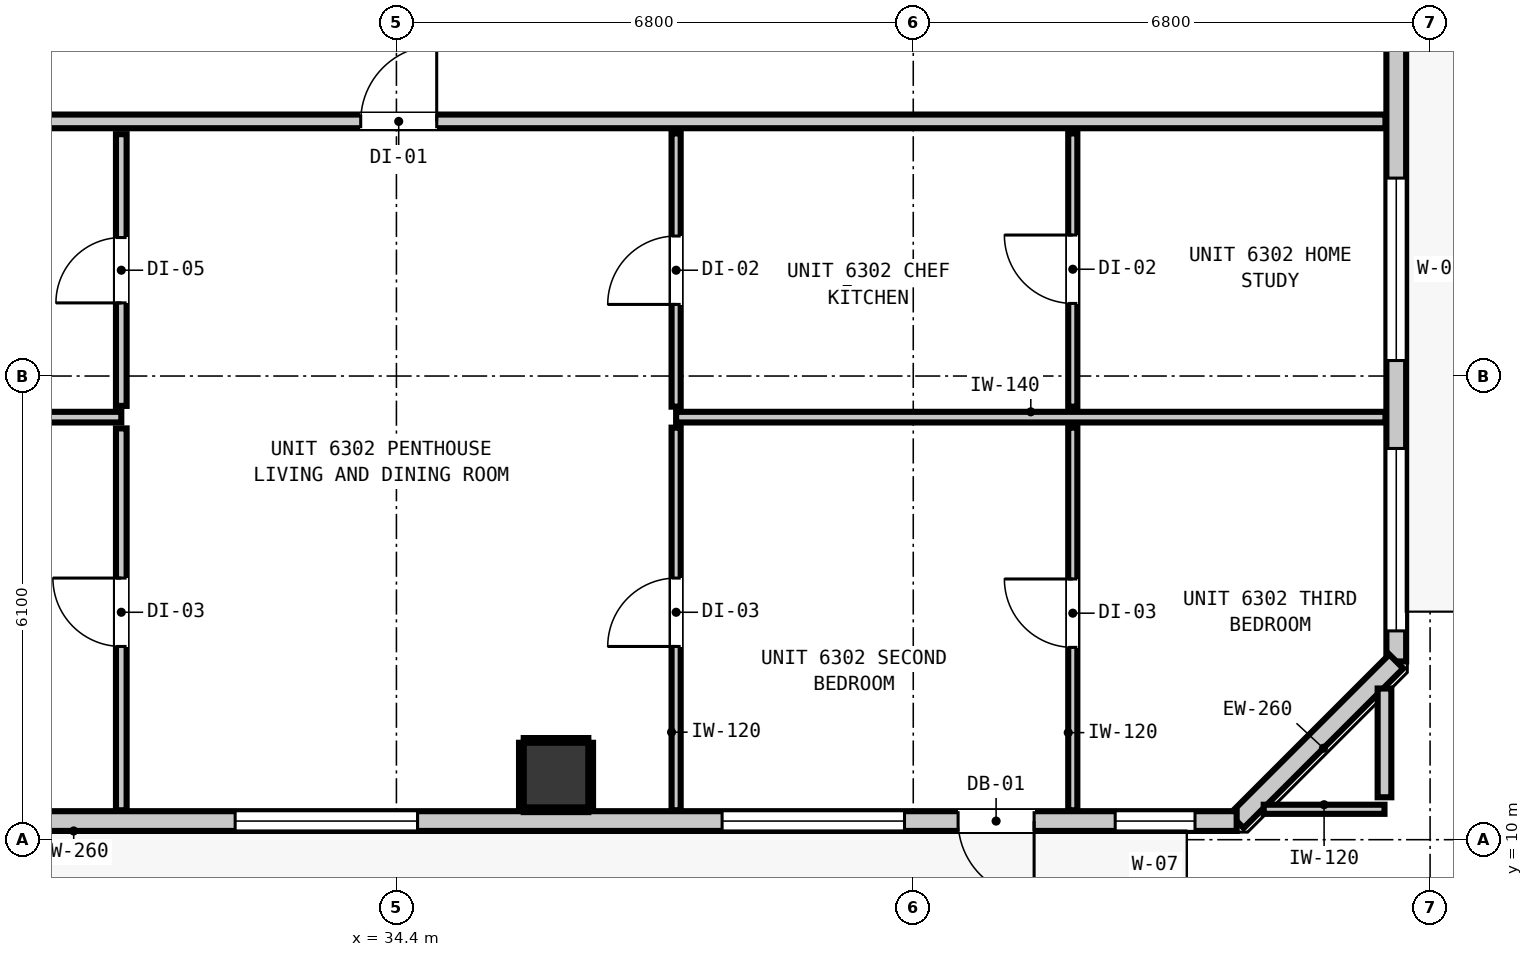
"""IFC4 building model, lengths in metres.
Left out: names, types, materials, properties, quantities, classifications, styles, units other than length and angle.
Written with IfcOpenShell. Run it as: python <this file> out.ifc"""

import sys

from ifc_helpers import new_model, si_unit, direction, frame, frame_2d, origin, origin_2d, place, context, subcontext, project, spatial, rectangle, extrude, element, fill, save


model = new_model("IFC4")
c1 = context("Model", 3, precision=1e-05, world=origin(), true_north=direction((0.0, 1.0)))
c2 = subcontext(c1, "Body", "Model", "MODEL_VIEW")
j1 = project(units=[si_unit("LENGTHUNIT", "METRE"), si_unit("PLANEANGLEUNIT", "RADIAN")], contexts=[c1])
p1 = place(None, origin())
s1 = spatial("IfcSite", under=j1, at=p1, CompositionType="ELEMENT")
p2 = place(p1, origin())
s2 = spatial("IfcBuilding", under=s1, at=p2, CompositionType="ELEMENT")
p3 = place(p2, frame((0.0, 0.0, 216.72)))
s3 = spatial("IfcBuildingStorey", under=s2, at=p3, CompositionType="ELEMENT", Elevation=216.72)
p4 = place(p3, frame((36.5, 10.85, 0.0), z_axis=(0.0, 0.0, 1.0), x_axis=(1.0, 0.0, 0.0)))
e1 = element("IfcColumn", 1, at=p4, inside=s3, PredefinedType="COLUMN", context=c2, shape_type="SweptSolid", body=[
    extrude(rectangle(XDim=0.85, YDim=0.85, at=origin_2d()), origin(), (0.0, 0.0, 1.0), 3.32),
])
p5 = place(p3, frame((47.555, 42.655, 0.0), z_axis=(0.0, 0.0, 1.0), x_axis=(0.0, -1.0, 0.0)))
e2 = element("IfcWall", 2, at=p5, inside=s3, PredefinedType="STANDARD", context=c2, shape_type="SweptSolid", body=[
    extrude(rectangle(XDim=30.31, YDim=0.26, at=frame_2d((15.155, 0.0))), origin(), (0.0, 0.0, 1.0), 3.1),
])
p6 = place(p5, frame((4.082, 0.0, 0.0)))
e3 = element("IfcOpeningElement", 3, at=p6, cuts=e2, PredefinedType="OPENING", context=c2, shape_type="SweptSolid", body=[
    extrude(rectangle(XDim=1.0, YDim=2.15, at=frame_2d((0.5, 1.075))), frame((0.0, 0.14, 0.0), z_axis=(0.0, -1.0, 0.0), x_axis=(1.0, 0.0, 0.0)), (0.0, 0.0, 1.0), 0.28),
])
p7 = place(p5, frame((23.951, 0.0, 0.85)))
e4 = element("IfcOpeningElement", 4, at=p7, cuts=e2, PredefinedType="OPENING", context=c2, shape_type="SweptSolid", body=[
    extrude(rectangle(XDim=2.4, YDim=1.95, at=frame_2d((1.2, 0.975))), frame((0.0, 0.14, 0.0), z_axis=(0.0, -1.0, 0.0), x_axis=(1.0, 0.0, 0.0)), (0.0, 0.0, 1.0), 0.28),
])
p8 = place(p5, frame((27.508, 0.0, 0.85)))
e5 = element("IfcOpeningElement", 5, at=p8, cuts=e2, PredefinedType="OPENING", context=c2, shape_type="SweptSolid", body=[
    extrude(rectangle(XDim=2.4, YDim=1.95, at=frame_2d((1.2, 0.975))), frame((0.0, 0.14, 0.0), z_axis=(0.0, -1.0, 0.0), x_axis=(1.0, 0.0, 0.0)), (0.0, 0.0, 1.0), 0.28),
])
p9 = place(p5, frame((15.105, 0.0, 0.85)))
e6 = element("IfcOpeningElement", 6, at=p9, cuts=e2, PredefinedType="OPENING", context=c2, shape_type="SweptSolid", body=[
    extrude(rectangle(XDim=2.4, YDim=1.95, at=frame_2d((1.2, 0.975))), frame((0.0, 0.14, 0.0), z_axis=(0.0, -1.0, 0.0), x_axis=(1.0, 0.0, 0.0)), (0.0, 0.0, 1.0), 0.28),
])
p10 = place(p3, frame((47.555, 12.345, 0.0), z_axis=(0.0, 0.0, 1.0), x_axis=(-0.707106781187, -0.707106781187, 0.0)))
e7 = element("IfcWall", 7, at=p10, inside=s3, PredefinedType="STANDARD", context=c2, shape_type="SweptSolid", body=[
    extrude(rectangle(XDim=2.97, YDim=0.26, at=frame_2d((1.485, 0.0))), origin(), (0.0, 0.0, 1.0), 3.1),
])
p11 = place(p3, frame((45.455, 10.245, 0.0), z_axis=(0.0, 0.0, 1.0), x_axis=(-1.0, 0.0, 0.0)))
e8 = element("IfcWall", 8, at=p11, inside=s3, PredefinedType="STANDARD", context=c2, shape_type="SweptSolid", body=[
    extrude(rectangle(XDim=32.71, YDim=0.26, at=frame_2d((16.355, 0.0))), origin(), (0.0, 0.0, 1.0), 3.1),
])
p12 = place(p11, frame((2.665, 0.0, 0.0)))
e9 = element("IfcOpeningElement", 9, at=p12, cuts=e8, PredefinedType="OPENING", context=c2, shape_type="SweptSolid", body=[
    extrude(rectangle(XDim=1.0, YDim=2.15, at=frame_2d((0.5, 1.075))), frame((0.0, 0.14, 0.0), z_axis=(0.0, -1.0, 0.0), x_axis=(1.0, 0.0, 0.0)), (0.0, 0.0, 1.0), 0.28),
])
p13 = place(p11, frame((27.147, 0.0, 0.85)))
e10 = element("IfcOpeningElement", 10, at=p13, cuts=e8, PredefinedType="OPENING", context=c2, shape_type="SweptSolid", body=[
    extrude(rectangle(XDim=2.4, YDim=1.95, at=frame_2d((1.2, 0.975))), frame((0.0, 0.14, 0.0), z_axis=(0.0, -1.0, 0.0), x_axis=(1.0, 0.0, 0.0)), (0.0, 0.0, 1.0), 0.28),
])
p14 = place(p11, frame((30.805, 0.0, 0.85)))
e11 = element("IfcOpeningElement", 11, at=p14, cuts=e8, PredefinedType="OPENING", context=c2, shape_type="SweptSolid", body=[
    extrude(rectangle(XDim=0.58, YDim=1.5, at=frame_2d((0.29, 0.75))), frame((0.0, 0.14, 0.0), z_axis=(0.0, -1.0, 0.0), x_axis=(1.0, 0.0, 0.0)), (0.0, 0.0, 1.0), 0.28),
])
p15 = place(p11, frame((21.3, 0.0, 0.85)))
e12 = element("IfcOpeningElement", 12, at=p15, cuts=e8, PredefinedType="OPENING", context=c2, shape_type="SweptSolid", body=[
    extrude(rectangle(XDim=2.4, YDim=1.95, at=frame_2d((1.2, 0.975))), frame((0.0, 0.14, 0.0), z_axis=(0.0, -1.0, 0.0), x_axis=(1.0, 0.0, 0.0)), (0.0, 0.0, 1.0), 0.28),
])
p16 = place(p11, frame((10.777, 0.0, 0.85)))
e13 = element("IfcOpeningElement", 13, at=p16, cuts=e8, PredefinedType="OPENING", context=c2, shape_type="SweptSolid", body=[
    extrude(rectangle(XDim=2.4, YDim=1.95, at=frame_2d((1.2, 0.975))), frame((0.0, 0.14, 0.0), z_axis=(0.0, -1.0, 0.0), x_axis=(1.0, 0.0, 0.0)), (0.0, 0.0, 1.0), 0.28),
])
p17 = place(p11, frame((17.425, 0.0, 0.85)))
e14 = element("IfcOpeningElement", 14, at=p17, cuts=e8, PredefinedType="OPENING", context=c2, shape_type="SweptSolid", body=[
    extrude(rectangle(XDim=2.4, YDim=1.95, at=frame_2d((1.2, 0.975))), frame((0.0, 0.14, 0.0), z_axis=(0.0, -1.0, 0.0), x_axis=(1.0, 0.0, 0.0)), (0.0, 0.0, 1.0), 0.28),
])
p18 = place(p11, frame((4.37, 0.0, 0.85)))
e15 = element("IfcOpeningElement", 15, at=p18, cuts=e8, PredefinedType="OPENING", context=c2, shape_type="SweptSolid", body=[
    extrude(rectangle(XDim=2.4, YDim=1.95, at=frame_2d((1.2, 0.975))), frame((0.0, 0.14, 0.0), z_axis=(0.0, -1.0, 0.0), x_axis=(1.0, 0.0, 0.0)), (0.0, 0.0, 1.0), 0.28),
])
p19 = place(p11, frame((0.548, 0.0, 0.85)))
e16 = element("IfcOpeningElement", 16, at=p19, cuts=e8, PredefinedType="OPENING", context=c2, shape_type="SweptSolid", body=[
    extrude(rectangle(XDim=1.05, YDim=1.65, at=frame_2d((0.525, 0.825))), frame((0.0, 0.14, 0.0), z_axis=(0.0, -1.0, 0.0), x_axis=(1.0, 0.0, 0.0)), (0.0, 0.0, 1.0), 0.28),
])
p20 = place(p3, frame((10.787, 19.45, 0.0), z_axis=(0.0, 0.0, 1.0), x_axis=(1.0, 0.0, 0.0)))
e17 = element("IfcWall", 17, at=p20, inside=s3, PredefinedType="PARTITIONING", context=c2, shape_type="SweptSolid", body=[
    extrude(rectangle(XDim=36.626, YDim=0.18, at=frame_2d((18.313, 0.0))), origin(), (0.0, 0.0, 1.0), 3.1),
])
p21 = place(p20, frame((5.82, 0.0, 0.0)))
e18 = element("IfcOpeningElement", 18, at=p21, cuts=e17, PredefinedType="OPENING", context=c2, shape_type="SweptSolid", body=[
    extrude(rectangle(XDim=1.0, YDim=2.15, at=frame_2d((0.5, 1.075))), frame((0.0, 0.1, 0.0), z_axis=(0.0, -1.0, 0.0), x_axis=(1.0, 0.0, 0.0)), (0.0, 0.0, 1.0), 0.2),
])
p22 = place(p20, frame((23.143, 0.0, 0.0)))
e19 = element("IfcOpeningElement", 19, at=p22, cuts=e17, PredefinedType="OPENING", context=c2, shape_type="SweptSolid", body=[
    extrude(rectangle(XDim=1.0, YDim=2.15, at=frame_2d((0.5, 1.075))), frame((0.0, 0.1, 0.0), z_axis=(0.0, -1.0, 0.0), x_axis=(1.0, 0.0, 0.0)), (0.0, 0.0, 1.0), 0.2),
])
p23 = place(p3, frame((19.22, 15.559, 0.0), z_axis=(0.0, 0.0, 1.0), x_axis=(1.0, 0.0, 0.0)))
e20 = element("IfcWall", 20, at=p23, inside=s3, PredefinedType="PARTITIONING", context=c2, shape_type="SweptSolid", body=[
    extrude(rectangle(XDim=11.56, YDim=0.14, at=frame_2d((5.78, 0.0))), origin(), (0.0, 0.0, 1.0), 3.1),
])
p24 = place(p3, frame((38.08, 15.559, 0.0), z_axis=(0.0, 0.0, 1.0), x_axis=(1.0, 0.0, 0.0)))
e21 = element("IfcWall", 21, at=p24, inside=s3, PredefinedType="PARTITIONING", context=c2, shape_type="SweptSolid", body=[
    extrude(rectangle(XDim=9.333, YDim=0.14, at=frame_2d((4.667, 0.0))), origin(), (0.0, 0.0, 1.0), 3.1),
])
p25 = place(p3, frame((45.811, 10.4, 0.0), z_axis=(0.0, 0.0, 1.0), x_axis=(1.0, 0.0, 0.0)))
e22 = element("IfcWall", 22, at=p25, inside=s3, PredefinedType="PARTITIONING", context=c2, shape_type="SweptSolid", body=[
    extrude(rectangle(XDim=1.589, YDim=0.12, at=frame_2d((0.794, 0.0))), origin(), (0.0, 0.0, 1.0), 3.1),
])
p26 = place(p3, frame((47.4, 10.558, 0.0), z_axis=(0.0, 0.0, 1.0), x_axis=(0.0, 1.0, 0.0)))
e23 = element("IfcWall", 23, at=p26, inside=s3, PredefinedType="PARTITIONING", context=c2, shape_type="SweptSolid", body=[
    extrude(rectangle(XDim=1.431, YDim=0.18, at=frame_2d((0.715, 0.0))), origin(), (0.0, 0.0, 1.0), 3.1),
])
p27 = place(p3, frame((30.78, 10.387, 0.0), z_axis=(0.0, 0.0, 1.0), x_axis=(0.0, 1.0, 0.0)))
e24 = element("IfcWall", 24, at=p27, inside=s3, PredefinedType="PARTITIONING", context=c2, shape_type="SweptSolid", body=[
    extrude(rectangle(XDim=5.024, YDim=0.14, at=frame_2d((2.512, 0.0))), origin(), (0.0, 0.0, 1.0), 3.1),
])
p28 = place(p27, frame((2.155, 0.0, 0.0)))
e25 = element("IfcOpeningElement", 25, at=p28, cuts=e24, PredefinedType="OPENING", context=c2, shape_type="SweptSolid", body=[
    extrude(rectangle(XDim=0.9, YDim=2.1, at=frame_2d((0.45, 1.05))), frame((0.0, 0.08, 0.0), z_axis=(0.0, -1.0, 0.0), x_axis=(1.0, 0.0, 0.0)), (0.0, 0.0, 1.0), 0.16),
])
p29 = place(p3, frame((30.78, 15.707, 0.0), z_axis=(0.0, 0.0, 1.0), x_axis=(0.0, 1.0, 0.0)))
e26 = element("IfcWall", 26, at=p29, inside=s3, PredefinedType="PARTITIONING", context=c2, shape_type="SweptSolid", body=[
    extrude(rectangle(XDim=3.575, YDim=0.14, at=frame_2d((1.788, 0.0))), origin(), (0.0, 0.0, 1.0), 3.1),
])
p30 = place(p29, frame((1.355, 0.0, 0.0)))
e27 = element("IfcOpeningElement", 27, at=p30, cuts=e26, PredefinedType="OPENING", context=c2, shape_type="SweptSolid", body=[
    extrude(rectangle(XDim=0.86, YDim=2.02, at=frame_2d((0.43, 1.01))), frame((0.0, 0.08, 0.0), z_axis=(0.0, -1.0, 0.0), x_axis=(1.0, 0.0, 0.0)), (0.0, 0.0, 1.0), 0.16),
])
p31 = place(p3, frame((38.08, 10.387, 0.0), z_axis=(0.0, 0.0, 1.0), x_axis=(0.0, 1.0, 0.0)))
e28 = element("IfcWall", 28, at=p31, inside=s3, PredefinedType="PARTITIONING", context=c2, shape_type="SweptSolid", body=[
    extrude(rectangle(XDim=5.034, YDim=0.12, at=frame_2d((2.517, 0.0))), origin(), (0.0, 0.0, 1.0), 3.1),
])
p32 = place(p31, frame((2.155, 0.0, 0.0)))
e29 = element("IfcOpeningElement", 29, at=p32, cuts=e28, PredefinedType="OPENING", context=c2, shape_type="SweptSolid", body=[
    extrude(rectangle(XDim=0.9, YDim=2.1, at=frame_2d((0.45, 1.05))), frame((0.0, 0.07, 0.0), z_axis=(0.0, -1.0, 0.0), x_axis=(1.0, 0.0, 0.0)), (0.0, 0.0, 1.0), 0.14),
])
p33 = place(p3, frame((38.08, 15.697, 0.0), z_axis=(0.0, 0.0, 1.0), x_axis=(0.0, 1.0, 0.0)))
e30 = element("IfcWall", 30, at=p33, inside=s3, PredefinedType="PARTITIONING", context=c2, shape_type="SweptSolid", body=[
    extrude(rectangle(XDim=3.595, YDim=0.12, at=frame_2d((1.797, 0.0))), origin(), (0.0, 0.0, 1.0), 3.1),
])
p34 = place(p33, frame((1.345, 0.0, 0.0)))
e31 = element("IfcOpeningElement", 31, at=p34, cuts=e30, PredefinedType="OPENING", context=c2, shape_type="SweptSolid", body=[
    extrude(rectangle(XDim=0.9, YDim=2.1, at=frame_2d((0.45, 1.05))), frame((0.0, 0.07, 0.0), z_axis=(0.0, -1.0, 0.0), x_axis=(1.0, 0.0, 0.0)), (0.0, 0.0, 1.0), 0.14),
])
p35 = place(p3, frame((43.299, 10.387, 0.0), z_axis=(0.0, 0.0, 1.0), x_axis=(0.0, 1.0, 0.0)))
e32 = element("IfcWall", 32, at=p35, inside=s3, PredefinedType="PARTITIONING", context=c2, shape_type="SweptSolid", body=[
    extrude(rectangle(XDim=5.034, YDim=0.12, at=frame_2d((2.517, 0.0))), origin(), (0.0, 0.0, 1.0), 3.1),
])
p36 = place(p35, frame((2.143, 0.0, 0.0)))
e33 = element("IfcOpeningElement", 33, at=p36, cuts=e32, PredefinedType="OPENING", context=c2, shape_type="SweptSolid", body=[
    extrude(rectangle(XDim=0.9, YDim=2.1, at=frame_2d((0.45, 1.05))), frame((0.0, 0.07, 0.0), z_axis=(0.0, -1.0, 0.0), x_axis=(1.0, 0.0, 0.0)), (0.0, 0.0, 1.0), 0.14),
])
p37 = place(p3, frame((43.299, 15.697, 0.0), z_axis=(0.0, 0.0, 1.0), x_axis=(0.0, 1.0, 0.0)))
e34 = element("IfcWall", 34, at=p37, inside=s3, PredefinedType="PARTITIONING", context=c2, shape_type="SweptSolid", body=[
    extrude(rectangle(XDim=3.595, YDim=0.12, at=frame_2d((1.797, 0.0))), origin(), (0.0, 0.0, 1.0), 3.1),
])
p38 = place(p37, frame((1.358, 0.0, 0.0)))
e35 = element("IfcOpeningElement", 35, at=p38, cuts=e34, PredefinedType="OPENING", context=c2, shape_type="SweptSolid", body=[
    extrude(rectangle(XDim=0.9, YDim=2.1, at=frame_2d((0.45, 1.05))), frame((0.0, 0.07, 0.0), z_axis=(0.0, -1.0, 0.0), x_axis=(1.0, 0.0, 0.0)), (0.0, 0.0, 1.0), 0.14),
])
for number, where, z_axis, x_axis in (
    (36, (36.075, 10.393, 0.0), (0.0, 0.0, 1.0), (1.0, 0.0, 0.0)),
    (37, (36.075, 11.307, 0.0), (0.0, 0.0, 1.0), (1.0, 0.0, 0.0)),
):
    element("IfcWall", number, at=place(p3, frame(where, z_axis=z_axis, x_axis=x_axis)), inside=s3, PredefinedType="PARTITIONING", context=c2, shape_type="SweptSolid", body=[
        extrude(rectangle(XDim=0.85, YDim=0.06, at=frame_2d((0.425, 0.0))), origin(), (0.0, 0.0, 1.0), 1.45),
    ])
for number, where, z_axis, x_axis in (
    (38, (36.043, 10.425, 0.0), (0.0, 0.0, 1.0), (0.0, 1.0, 0.0)),
    (39, (36.957, 10.425, 0.0), (0.0, 0.0, 1.0), (0.0, 1.0, 0.0)),
):
    element("IfcWall", number, at=place(p3, frame(where, z_axis=z_axis, x_axis=x_axis)), inside=s3, PredefinedType="PARTITIONING", context=c2, shape_type="SweptSolid", body=[
        extrude(rectangle(XDim=0.85, YDim=0.06, at=frame_2d((0.425, 0.0))), origin(), (0.0, 0.0, 1.0), 1.45),
    ])
p39 = place(p12, origin())
e40 = element("IfcDoor", 40, at=p39, inside=s3, OperationType="SINGLE_SWING_LEFT", PredefinedType="DOOR", context=c2, shape_type="SweptSolid", body=[
    extrude(rectangle(XDim=1.0, YDim=2.15, at=frame_2d((0.5, 1.075))), frame((0.0, 0.025, 0.0), z_axis=(0.0, -1.0, 0.0), x_axis=(1.0, 0.0, 0.0)), (0.0, 0.0, 1.0), 0.05),
])
fill(e9, e40)
p40 = place(p7, origin())
e41 = element("IfcWindow", 41, at=p40, inside=s3, PartitioningType="SINGLE_PANEL", PredefinedType="WINDOW", context=c2, shape_type="SweptSolid", body=[
    extrude(rectangle(XDim=2.4, YDim=1.95, at=frame_2d((1.2, 0.975))), frame((0.0, 0.03, 0.0), z_axis=(0.0, -1.0, 0.0), x_axis=(1.0, 0.0, 0.0)), (0.0, 0.0, 1.0), 0.06),
])
fill(e4, e41)
p41 = place(p8, origin())
e42 = element("IfcWindow", 42, at=p41, inside=s3, PartitioningType="SINGLE_PANEL", PredefinedType="WINDOW", context=c2, shape_type="SweptSolid", body=[
    extrude(rectangle(XDim=2.4, YDim=1.95, at=frame_2d((1.2, 0.975))), frame((0.0, 0.03, 0.0), z_axis=(0.0, -1.0, 0.0), x_axis=(1.0, 0.0, 0.0)), (0.0, 0.0, 1.0), 0.06),
])
fill(e5, e42)
p42 = place(p16, origin())
e43 = element("IfcWindow", 43, at=p42, inside=s3, PartitioningType="SINGLE_PANEL", PredefinedType="WINDOW", context=c2, shape_type="SweptSolid", body=[
    extrude(rectangle(XDim=2.4, YDim=1.95, at=frame_2d((1.2, 0.975))), frame((0.0, 0.03, 0.0), z_axis=(0.0, -1.0, 0.0), x_axis=(1.0, 0.0, 0.0)), (0.0, 0.0, 1.0), 0.06),
])
fill(e13, e43)
p43 = place(p18, origin())
e44 = element("IfcWindow", 44, at=p43, inside=s3, PartitioningType="SINGLE_PANEL", PredefinedType="WINDOW", context=c2, shape_type="SweptSolid", body=[
    extrude(rectangle(XDim=2.4, YDim=1.95, at=frame_2d((1.2, 0.975))), frame((0.0, 0.03, 0.0), z_axis=(0.0, -1.0, 0.0), x_axis=(1.0, 0.0, 0.0)), (0.0, 0.0, 1.0), 0.06),
])
fill(e15, e44)
p44 = place(p19, origin())
e45 = element("IfcWindow", 45, at=p44, inside=s3, PartitioningType="SINGLE_PANEL", PredefinedType="WINDOW", context=c2, shape_type="SweptSolid", body=[
    extrude(rectangle(XDim=1.05, YDim=1.65, at=frame_2d((0.525, 0.825))), frame((0.0, 0.03, 0.0), z_axis=(0.0, -1.0, 0.0), x_axis=(1.0, 0.0, 0.0)), (0.0, 0.0, 1.0), 0.06),
])
fill(e16, e45)
p45 = place(p22, origin())
e46 = element("IfcDoor", 46, at=p45, inside=s3, OperationType="SINGLE_SWING_RIGHT", PredefinedType="DOOR", context=c2, shape_type="SweptSolid", body=[
    extrude(rectangle(XDim=1.0, YDim=2.15, at=frame_2d((0.5, 1.075))), frame((0.0, 0.025, 0.0), z_axis=(0.0, -1.0, 0.0), x_axis=(1.0, 0.0, 0.0)), (0.0, 0.0, 1.0), 0.05),
])
fill(e19, e46)
p46 = place(p30, origin())
e47 = element("IfcDoor", 47, at=p46, inside=s3, OperationType="SINGLE_SWING_LEFT", PredefinedType="DOOR", context=c2, shape_type="SweptSolid", body=[
    extrude(rectangle(XDim=0.86, YDim=2.02, at=frame_2d((0.43, 1.01))), frame((0.0, 0.025, 0.0), z_axis=(0.0, -1.0, 0.0), x_axis=(1.0, 0.0, 0.0)), (0.0, 0.0, 1.0), 0.05),
])
fill(e27, e47)
p47 = place(p28, origin())
e48 = element("IfcDoor", 48, at=p47, inside=s3, OperationType="SINGLE_SWING_RIGHT", PredefinedType="DOOR", context=c2, shape_type="SweptSolid", body=[
    extrude(rectangle(XDim=0.9, YDim=2.1, at=frame_2d((0.45, 1.05))), frame((0.0, 0.025, 0.0), z_axis=(0.0, -1.0, 0.0), x_axis=(1.0, 0.0, 0.0)), (0.0, 0.0, 1.0), 0.05),
])
fill(e25, e48)
p48 = place(p34, origin())
e49 = element("IfcDoor", 49, at=p48, inside=s3, OperationType="SINGLE_SWING_LEFT", PredefinedType="DOOR", context=c2, shape_type="SweptSolid", body=[
    extrude(rectangle(XDim=0.9, YDim=2.1, at=frame_2d((0.45, 1.05))), frame((0.0, 0.025, 0.0), z_axis=(0.0, -1.0, 0.0), x_axis=(1.0, 0.0, 0.0)), (0.0, 0.0, 1.0), 0.05),
])
fill(e31, e49)
p49 = place(p38, origin())
e50 = element("IfcDoor", 50, at=p49, inside=s3, OperationType="SINGLE_SWING_RIGHT", PredefinedType="DOOR", context=c2, shape_type="SweptSolid", body=[
    extrude(rectangle(XDim=0.9, YDim=2.1, at=frame_2d((0.45, 1.05))), frame((0.0, 0.025, 0.0), z_axis=(0.0, -1.0, 0.0), x_axis=(1.0, 0.0, 0.0)), (0.0, 0.0, 1.0), 0.05),
])
fill(e35, e50)
p50 = place(p32, origin())
e51 = element("IfcDoor", 51, at=p50, inside=s3, OperationType="SINGLE_SWING_LEFT", PredefinedType="DOOR", context=c2, shape_type="SweptSolid", body=[
    extrude(rectangle(XDim=0.9, YDim=2.1, at=frame_2d((0.45, 1.05))), frame((0.0, 0.025, 0.0), z_axis=(0.0, -1.0, 0.0), x_axis=(1.0, 0.0, 0.0)), (0.0, 0.0, 1.0), 0.05),
])
fill(e29, e51)
p51 = place(p36, origin())
e52 = element("IfcDoor", 52, at=p51, inside=s3, OperationType="SINGLE_SWING_RIGHT", PredefinedType="DOOR", context=c2, shape_type="SweptSolid", body=[
    extrude(rectangle(XDim=0.9, YDim=2.1, at=frame_2d((0.45, 1.05))), frame((0.0, 0.025, 0.0), z_axis=(0.0, -1.0, 0.0), x_axis=(1.0, 0.0, 0.0)), (0.0, 0.0, 1.0), 0.05),
])
fill(e33, e52)
save(model, sys.argv[1])
